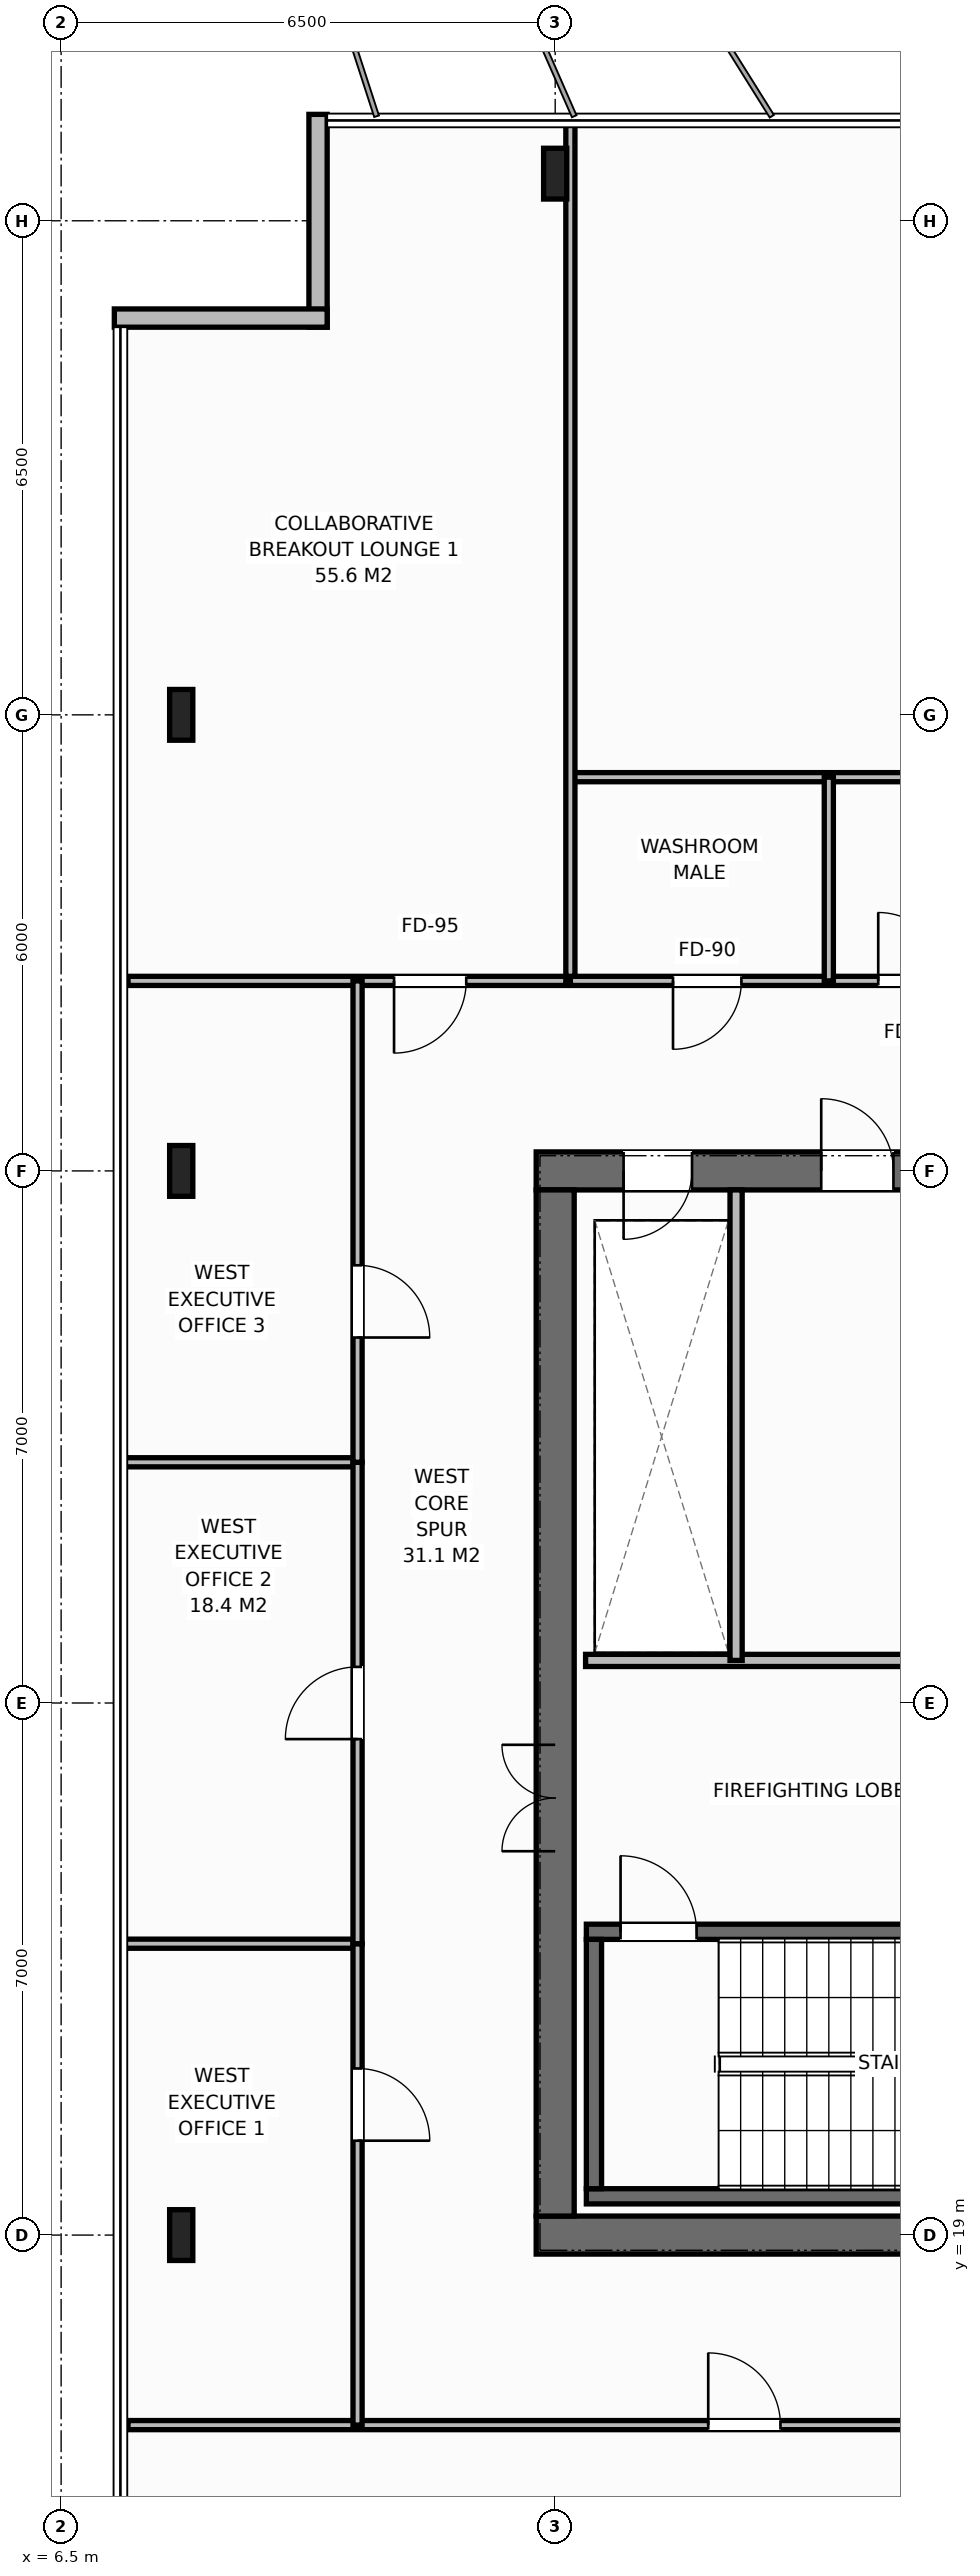
"""IFC4 building model, lengths in metres.
Left out: names, types, materials, properties, quantities, classifications, styles, units other than length and angle.
Written with IfcOpenShell. Run it as: python <this file> out.ifc"""

import sys

from ifc_helpers import new_model, si_unit, direction, frame, frame_2d, origin, origin_2d, place, context, subcontext, project, spatial, rectangle, i_section, extrude, element, fill, save


model = new_model("IFC4")
c1 = context("Model", 3, precision=1e-05, world=origin(), true_north=direction((0.0, 1.0)))
c2 = subcontext(c1, "Body", "Model", "MODEL_VIEW")
j1 = project(units=[si_unit("LENGTHUNIT", "METRE"), si_unit("PLANEANGLEUNIT", "RADIAN")], contexts=[c1])
p1 = place(None, origin())
s1 = spatial("IfcSite", under=j1, at=p1, CompositionType="ELEMENT")
p2 = place(p1, origin())
s2 = spatial("IfcBuilding", under=s1, at=p2, CompositionType="ELEMENT")
p3 = place(p2, frame((0.0, 0.0, 263.2)))
s3 = spatial("IfcBuildingStorey", under=s2, at=p3, CompositionType="ELEMENT", Elevation=263.2)
p4 = place(p3, frame((12.75, 19.0, 0.0), z_axis=(0.0, 0.0, 1.0), x_axis=(1.0, 0.0, 0.0)))
e1 = element("IfcWall", 1, at=p4, inside=s3, PredefinedType="SHEAR", context=c2, shape_type="SweptSolid", body=[
    extrude(rectangle(XDim=13.5, YDim=0.5, at=frame_2d((6.75, 0.0))), origin(), (0.0, 0.0, 1.0), 3.8),
])
p5 = place(p4, frame((9.13, 0.0, 0.0)))
e2 = element("IfcOpeningElement", 2, at=p5, cuts=e1, PredefinedType="OPENING", context=c2, shape_type="SweptSolid", body=[
    extrude(rectangle(XDim=1.4, YDim=2.2, at=frame_2d((0.7, 1.1))), frame((0.0, 0.26, 0.0), z_axis=(0.0, -1.0, 0.0), x_axis=(1.0, 0.0, 0.0)), (0.0, 0.0, 1.0), 0.52),
])
p6 = place(p3, frame((12.75, 33.0, 0.0), z_axis=(0.0, 0.0, 1.0), x_axis=(1.0, 0.0, 0.0)))
e3 = element("IfcWall", 3, at=p6, inside=s3, PredefinedType="SHEAR", context=c2, shape_type="SweptSolid", body=[
    extrude(rectangle(XDim=13.5, YDim=0.5, at=frame_2d((6.75, 0.0))), origin(), (0.0, 0.0, 1.0), 3.8),
])
p7 = place(p6, frame((1.15, 0.0, 0.0)))
e4 = element("IfcOpeningElement", 4, at=p7, cuts=e3, PredefinedType="OPENING", context=c2, shape_type="SweptSolid", body=[
    extrude(rectangle(XDim=0.9, YDim=2.15, at=frame_2d((0.45, 1.075))), frame((0.0, 0.26, 0.0), z_axis=(0.0, -1.0, 0.0), x_axis=(1.0, 0.0, 0.0)), (0.0, 0.0, 1.0), 0.52),
])
p8 = place(p6, frame((3.75, 0.0, 0.0)))
e5 = element("IfcOpeningElement", 5, at=p8, cuts=e3, PredefinedType="OPENING", context=c2, shape_type="SweptSolid", body=[
    extrude(rectangle(XDim=0.95, YDim=2.15, at=frame_2d((0.475, 1.075))), frame((0.0, 0.26, 0.0), z_axis=(0.0, -1.0, 0.0), x_axis=(1.0, 0.0, 0.0)), (0.0, 0.0, 1.0), 0.52),
])
p9 = place(p6, frame((6.75, 0.0, 0.0)))
e6 = element("IfcOpeningElement", 6, at=p9, cuts=e3, PredefinedType="OPENING", context=c2, shape_type="SweptSolid", body=[
    extrude(rectangle(XDim=0.95, YDim=2.15, at=frame_2d((0.475, 1.075))), frame((0.0, 0.26, 0.0), z_axis=(0.0, -1.0, 0.0), x_axis=(1.0, 0.0, 0.0)), (0.0, 0.0, 1.0), 0.52),
])
p10 = place(p6, frame((9.13, 0.0, 0.0)))
e7 = element("IfcOpeningElement", 7, at=p10, cuts=e3, PredefinedType="OPENING", context=c2, shape_type="SweptSolid", body=[
    extrude(rectangle(XDim=1.4, YDim=2.2, at=frame_2d((0.7, 1.1))), frame((0.0, 0.26, 0.0), z_axis=(0.0, -1.0, 0.0), x_axis=(1.0, 0.0, 0.0)), (0.0, 0.0, 1.0), 0.52),
])
p11 = place(p3, frame((13.0, 19.25, 0.0), z_axis=(0.0, 0.0, 1.0), x_axis=(0.0, 1.0, 0.0)))
e8 = element("IfcWall", 8, at=p11, inside=s3, PredefinedType="SHEAR", context=c2, shape_type="SweptSolid", body=[
    extrude(rectangle(XDim=13.5, YDim=0.5, at=frame_2d((6.75, 0.0))), origin(), (0.0, 0.0, 1.0), 3.8),
])
p12 = place(p11, frame((4.8, 0.0, 0.0)))
e9 = element("IfcOpeningElement", 9, at=p12, cuts=e8, PredefinedType="OPENING", context=c2, shape_type="SweptSolid", body=[
    extrude(rectangle(XDim=1.4, YDim=2.2, at=frame_2d((0.7, 1.1))), frame((0.0, 0.26, 0.0), z_axis=(0.0, -1.0, 0.0), x_axis=(1.0, 0.0, 0.0)), (0.0, 0.0, 1.0), 0.52),
])
p13 = place(p3, frame((13.41, 19.51, 0.0), z_axis=(0.0, 0.0, 1.0), x_axis=(1.0, 0.0, 0.0)))
e10 = element("IfcWall", 10, at=p13, inside=s3, PredefinedType="SHEAR", context=c2, shape_type="SweptSolid", body=[
    extrude(rectangle(XDim=8.43, YDim=0.2, at=frame_2d((4.215, 0.0))), origin(), (0.0, 0.0, 1.0), 3.8),
])
p14 = place(p3, frame((13.41, 22.99, 0.0), z_axis=(0.0, 0.0, 1.0), x_axis=(1.0, 0.0, 0.0)))
e11 = element("IfcWall", 11, at=p14, inside=s3, PredefinedType="SHEAR", context=c2, shape_type="SweptSolid", body=[
    extrude(rectangle(XDim=8.43, YDim=0.2, at=frame_2d((4.215, 0.0))), origin(), (0.0, 0.0, 1.0), 3.8),
])
p15 = place(p14, frame((0.45, 0.0, 0.0)))
e12 = element("IfcOpeningElement", 12, at=p15, cuts=e11, PredefinedType="OPENING", context=c2, shape_type="SweptSolid", body=[
    extrude(rectangle(XDim=1.0, YDim=2.15, at=frame_2d((0.5, 1.075))), frame((0.0, 0.11, 0.0), z_axis=(0.0, -1.0, 0.0), x_axis=(1.0, 0.0, 0.0)), (0.0, 0.0, 1.0), 0.22),
])
p16 = place(p3, frame((13.51, 19.61, 0.0), z_axis=(0.0, 0.0, 1.0), x_axis=(0.0, 1.0, 0.0)))
e13 = element("IfcWall", 13, at=p16, inside=s3, PredefinedType="SHEAR", context=c2, shape_type="SweptSolid", body=[
    extrude(rectangle(XDim=3.28, YDim=0.2, at=frame_2d((1.64, 0.0))), origin(), (0.0, 0.0, 1.0), 3.8),
])
for number, where, z_axis, x_axis in (
    (14, (13.0, 46.12, 0.0), (0.0, 0.0, 1.0), (1.0, 0.0, 0.0)),
    (15, (8.08, 19.0, 0.0), (0.0, 0.0, 1.0), (1.0, 0.0, 0.0)),
    (16, (8.08, 33.0, 0.0), (0.0, 0.0, 1.0), (1.0, 0.0, 0.0)),
    (17, (8.08, 39.0, 0.0), (0.0, 0.0, 1.0), (1.0, 0.0, 0.0)),
):
    element("IfcColumn", number, at=place(p3, frame(where, z_axis=z_axis, x_axis=x_axis)), inside=s3, PredefinedType="COLUMN", context=c2, shape_type="SweptSolid", body=[
        extrude(i_section(OverallWidth=0.305, OverallDepth=0.668, WebThickness=0.021, FlangeThickness=0.04, at=origin_2d()), origin(), (0.0, 0.0, 1.0), 3.8),
    ])
p17 = place(p3, frame((9.88, 44.1, 0.0), z_axis=(0.0, 0.0, 1.0), x_axis=(0.0, 1.0, 0.0)))
e18 = element("IfcWall", 18, at=p17, inside=s3, PredefinedType="STANDARD", context=c2, shape_type="SweptSolid", body=[
    extrude(rectangle(XDim=2.8, YDim=0.24, at=frame_2d((1.4, 0.0))), origin(), (0.0, 0.0, 1.0), 3.588),
])
p18 = place(p3, frame((7.2, 44.22, 0.0), z_axis=(0.0, 0.0, 1.0), x_axis=(1.0, 0.0, 0.0)))
e19 = element("IfcWall", 19, at=p18, inside=s3, PredefinedType="STANDARD", context=c2, shape_type="SweptSolid", body=[
    extrude(rectangle(XDim=2.8, YDim=0.24, at=frame_2d((1.4, 0.0))), origin(), (0.0, 0.0, 1.0), 3.588),
])
p19 = place(p3, frame((13.4, 26.56, 0.0), z_axis=(0.0, 0.0, 1.0), x_axis=(1.0, 0.0, 0.0)))
e20 = element("IfcWall", 20, at=p19, inside=s3, PredefinedType="STANDARD", context=c2, shape_type="SweptSolid", body=[
    extrude(rectangle(XDim=8.34, YDim=0.16, at=frame_2d((4.17, 0.0))), origin(), (0.0, 0.0, 1.0), 3.588),
])
p20 = place(p3, frame((15.38, 26.56, 0.0), z_axis=(0.0, 0.0, 1.0), x_axis=(0.0, 1.0, 0.0)))
e21 = element("IfcWall", 21, at=p20, inside=s3, PredefinedType="STANDARD", context=c2, shape_type="SweptSolid", body=[
    extrude(rectangle(XDim=6.19, YDim=0.16, at=frame_2d((3.095, 0.0))), origin(), (0.0, 0.0, 1.0), 3.588),
])
p21 = place(p3, frame((13.2, 35.5, 0.0), z_axis=(0.0, 0.0, 1.0), x_axis=(1.0, 0.0, 0.0)))
e22 = element("IfcWall", 22, at=p21, inside=s3, PredefinedType="PARTITIONING", context=c2, shape_type="SweptSolid", body=[
    extrude(rectangle(XDim=13.16, YDim=0.12, at=frame_2d((6.58, 0.0))), origin(), (0.0, 0.0, 1.0), 3.588),
])
p22 = place(p21, frame((1.35, 0.0, 0.0)))
e23 = element("IfcOpeningElement", 23, at=p22, cuts=e22, PredefinedType="OPENING", context=c2, shape_type="SweptSolid", body=[
    extrude(rectangle(XDim=0.9, YDim=2.15, at=frame_2d((0.45, 1.075))), frame((0.0, 0.07, 0.0), z_axis=(0.0, -1.0, 0.0), x_axis=(1.0, 0.0, 0.0)), (0.0, 0.0, 1.0), 0.14),
])
p23 = place(p21, frame((4.05, 0.0, 0.0)))
e24 = element("IfcOpeningElement", 24, at=p23, cuts=e22, PredefinedType="OPENING", context=c2, shape_type="SweptSolid", body=[
    extrude(rectangle(XDim=0.9, YDim=2.15, at=frame_2d((0.45, 1.075))), frame((0.0, 0.07, 0.0), z_axis=(0.0, -1.0, 0.0), x_axis=(1.0, 0.0, 0.0)), (0.0, 0.0, 1.0), 0.14),
])
p24 = place(p21, frame((8.25, 0.0, 0.0)))
e25 = element("IfcOpeningElement", 25, at=p24, cuts=e22, PredefinedType="OPENING", context=c2, shape_type="SweptSolid", body=[
    extrude(rectangle(XDim=0.9, YDim=2.15, at=frame_2d((0.45, 1.075))), frame((0.0, 0.07, 0.0), z_axis=(0.0, -1.0, 0.0), x_axis=(1.0, 0.0, 0.0)), (0.0, 0.0, 1.0), 0.14),
])
p25 = place(p21, frame((11.0, 0.0, 0.0)))
e26 = element("IfcOpeningElement", 26, at=p25, cuts=e22, PredefinedType="OPENING", context=c2, shape_type="SweptSolid", body=[
    extrude(rectangle(XDim=0.95, YDim=2.15, at=frame_2d((0.475, 1.075))), frame((0.0, 0.07, 0.0), z_axis=(0.0, -1.0, 0.0), x_axis=(1.0, 0.0, 0.0)), (0.0, 0.0, 1.0), 0.14),
])
p26 = place(p3, frame((13.2, 38.18, 0.0), z_axis=(0.0, 0.0, 1.0), x_axis=(1.0, 0.0, 0.0)))
e27 = element("IfcWall", 27, at=p26, inside=s3, PredefinedType="PARTITIONING", context=c2, shape_type="SweptSolid", body=[
    extrude(rectangle(XDim=13.16, YDim=0.12, at=frame_2d((6.58, 0.0))), origin(), (0.0, 0.0, 1.0), 3.588),
])
p27 = place(p3, frame((16.6, 35.5, 0.0), z_axis=(0.0, 0.0, 1.0), x_axis=(0.0, 1.0, 0.0)))
e28 = element("IfcWall", 28, at=p27, inside=s3, PredefinedType="PARTITIONING", context=c2, shape_type="SweptSolid", body=[
    extrude(rectangle(XDim=2.68, YDim=0.12, at=frame_2d((1.34, 0.0))), origin(), (0.0, 0.0, 1.0), 3.588),
])
p28 = place(p3, frame((13.2, 35.56, 0.0), z_axis=(0.0, 0.0, 1.0), x_axis=(0.0, 1.0, 0.0)))
e29 = element("IfcWall", 29, at=p28, inside=s3, PredefinedType="PARTITIONING", context=c2, shape_type="SweptSolid", body=[
    extrude(rectangle(XDim=11.32, YDim=0.12, at=frame_2d((5.66, 0.0))), origin(), (0.0, 0.0, 1.0), 2.788),
])
p29 = place(p3, frame((7.38, 35.5, 0.0), z_axis=(0.0, 0.0, 1.0), x_axis=(1.0, 0.0, 0.0)))
e30 = element("IfcWall", 30, at=p29, inside=s3, PredefinedType="PARTITIONING", context=c2, shape_type="SweptSolid", body=[
    extrude(rectangle(XDim=5.76, YDim=0.12, at=frame_2d((2.88, 0.0))), origin(), (0.0, 0.0, 1.0), 3.588),
])
p30 = place(p29, frame((3.5, 0.0, 0.0)))
e31 = element("IfcOpeningElement", 31, at=p30, cuts=e30, PredefinedType="OPENING", context=c2, shape_type="SweptSolid", body=[
    extrude(rectangle(XDim=0.95, YDim=2.15, at=frame_2d((0.475, 1.075))), frame((0.0, 0.07, 0.0), z_axis=(0.0, -1.0, 0.0), x_axis=(1.0, 0.0, 0.0)), (0.0, 0.0, 1.0), 0.14),
])
p31 = place(p3, frame((7.38, 16.5, 0.0), z_axis=(0.0, 0.0, 1.0), x_axis=(1.0, 0.0, 0.0)))
e32 = element("IfcWall", 32, at=p31, inside=s3, PredefinedType="PARTITIONING", context=c2, shape_type="SweptSolid", body=[
    extrude(rectangle(XDim=13.197, YDim=0.12, at=frame_2d((6.598, 0.0))), origin(), (0.0, 0.0, 1.0), 3.588),
])
p32 = place(p31, frame((7.633, 0.0, 0.0)))
e33 = element("IfcOpeningElement", 33, at=p32, cuts=e32, PredefinedType="OPENING", context=c2, shape_type="SweptSolid", body=[
    extrude(rectangle(XDim=0.95, YDim=2.15, at=frame_2d((0.475, 1.075))), frame((0.0, 0.07, 0.0), z_axis=(0.0, -1.0, 0.0), x_axis=(1.0, 0.0, 0.0)), (0.0, 0.0, 1.0), 0.14),
])
p33 = place(p3, frame((7.22, 22.833, 0.0), z_axis=(0.0, 0.0, 1.0), x_axis=(1.0, 0.0, 0.0)))
e34 = element("IfcWall", 34, at=p33, inside=s3, PredefinedType="PARTITIONING", context=c2, shape_type="SweptSolid", body=[
    extrude(rectangle(XDim=3.18, YDim=0.12, at=frame_2d((1.59, 0.0))), origin(), (0.0, 0.0, 1.0), 3.588),
])
p34 = place(p3, frame((10.4, 16.5, 0.0), z_axis=(0.0, 0.0, 1.0), x_axis=(0.0, 1.0, 0.0)))
e35 = element("IfcWall", 35, at=p34, inside=s3, PredefinedType="PARTITIONING", context=c2, shape_type="SweptSolid", body=[
    extrude(rectangle(XDim=6.333, YDim=0.12, at=frame_2d((3.167, 0.0))), origin(), (0.0, 0.0, 1.0), 3.588),
])
p35 = place(p34, frame((3.742, 0.0, 0.0)))
e36 = element("IfcOpeningElement", 36, at=p35, cuts=e35, PredefinedType="OPENING", context=c2, shape_type="SweptSolid", body=[
    extrude(rectangle(XDim=0.95, YDim=2.15, at=frame_2d((0.475, 1.075))), frame((0.0, 0.07, 0.0), z_axis=(0.0, -1.0, 0.0), x_axis=(1.0, 0.0, 0.0)), (0.0, 0.0, 1.0), 0.14),
])
p36 = place(p3, frame((7.22, 29.167, 0.0), z_axis=(0.0, 0.0, 1.0), x_axis=(1.0, 0.0, 0.0)))
e37 = element("IfcWall", 37, at=p36, inside=s3, PredefinedType="PARTITIONING", context=c2, shape_type="SweptSolid", body=[
    extrude(rectangle(XDim=3.18, YDim=0.12, at=frame_2d((1.59, 0.0))), origin(), (0.0, 0.0, 1.0), 3.588),
])
p37 = place(p3, frame((10.4, 22.833, 0.0), z_axis=(0.0, 0.0, 1.0), x_axis=(0.0, 1.0, 0.0)))
e38 = element("IfcWall", 38, at=p37, inside=s3, PredefinedType="PARTITIONING", context=c2, shape_type="SweptSolid", body=[
    extrude(rectangle(XDim=6.333, YDim=0.12, at=frame_2d((3.167, 0.0))), origin(), (0.0, 0.0, 1.0), 3.588),
])
p38 = place(p37, frame((2.692, 0.0, 0.0)))
e39 = element("IfcOpeningElement", 39, at=p38, cuts=e38, PredefinedType="OPENING", context=c2, shape_type="SweptSolid", body=[
    extrude(rectangle(XDim=0.95, YDim=2.15, at=frame_2d((0.475, 1.075))), frame((0.0, 0.07, 0.0), z_axis=(0.0, -1.0, 0.0), x_axis=(1.0, 0.0, 0.0)), (0.0, 0.0, 1.0), 0.14),
])
p39 = place(p3, frame((10.4, 29.167, 0.0), z_axis=(0.0, 0.0, 1.0), x_axis=(0.0, 1.0, 0.0)))
e40 = element("IfcWall", 40, at=p39, inside=s3, PredefinedType="PARTITIONING", context=c2, shape_type="SweptSolid", body=[
    extrude(rectangle(XDim=6.333, YDim=0.12, at=frame_2d((3.167, 0.0))), origin(), (0.0, 0.0, 1.0), 3.588),
])
p40 = place(p39, frame((1.642, 0.0, 0.0)))
e41 = element("IfcOpeningElement", 41, at=p40, cuts=e40, PredefinedType="OPENING", context=c2, shape_type="SweptSolid", body=[
    extrude(rectangle(XDim=0.95, YDim=2.15, at=frame_2d((0.475, 1.075))), frame((0.0, 0.07, 0.0), z_axis=(0.0, -1.0, 0.0), x_axis=(1.0, 0.0, 0.0)), (0.0, 0.0, 1.0), 0.14),
])
p41 = place(p15, origin())
e42 = element("IfcDoor", 42, at=p41, inside=s3, OperationType="SINGLE_SWING_LEFT", PredefinedType="DOOR", context=c2, shape_type="SweptSolid", body=[
    extrude(rectangle(XDim=1.0, YDim=2.15, at=frame_2d((0.5, 1.075))), frame((0.0, 0.025, 0.0), z_axis=(0.0, -1.0, 0.0), x_axis=(1.0, 0.0, 0.0)), (0.0, 0.0, 1.0), 0.05),
])
fill(e12, e42)
p42 = place(p12, origin())
e43 = element("IfcDoor", 43, at=p42, inside=s3, OperationType="DOUBLE_DOOR_SINGLE_SWING", PredefinedType="DOOR", context=c2, shape_type="SweptSolid", body=[
    extrude(rectangle(XDim=1.4, YDim=2.2, at=frame_2d((0.7, 1.1))), frame((0.0, 0.025, 0.0), z_axis=(0.0, -1.0, 0.0), x_axis=(1.0, 0.0, 0.0)), (0.0, 0.0, 1.0), 0.05),
])
fill(e9, e43)
p43 = place(p7, origin())
e44 = element("IfcDoor", 44, at=p43, inside=s3, OperationType="SINGLE_SWING_RIGHT", PredefinedType="DOOR", context=c2, shape_type="SweptSolid", body=[
    extrude(rectangle(XDim=0.9, YDim=2.15, at=frame_2d((0.45, 1.075))), frame((0.0, -0.025, 0.0), z_axis=(0.0, -1.0, 0.0), x_axis=(1.0, 0.0, 0.0)), (0.0, 0.0, 1.0), 0.05),
])
fill(e4, e44)
p44 = place(p8, origin())
e45 = element("IfcDoor", 45, at=p44, inside=s3, OperationType="SINGLE_SWING_LEFT", PredefinedType="DOOR", context=c2, shape_type="SweptSolid", body=[
    extrude(rectangle(XDim=0.95, YDim=2.15, at=frame_2d((0.475, 1.075))), frame((0.0, -0.025, 0.0), z_axis=(0.0, -1.0, 0.0), x_axis=(1.0, 0.0, 0.0)), (0.0, 0.0, 1.0), 0.05),
])
fill(e5, e45)
p45 = place(p22, origin())
e46 = element("IfcDoor", 46, at=p45, inside=s3, OperationType="SINGLE_SWING_RIGHT", PredefinedType="DOOR", context=c2, shape_type="SweptSolid", body=[
    extrude(rectangle(XDim=0.9, YDim=2.15, at=frame_2d((0.45, 1.075))), frame((0.0, 0.025, 0.0), z_axis=(0.0, -1.0, 0.0), x_axis=(1.0, 0.0, 0.0)), (0.0, 0.0, 1.0), 0.05),
])
fill(e23, e46)
p46 = place(p23, origin())
e47 = element("IfcDoor", 47, at=p46, inside=s3, OperationType="SINGLE_SWING_LEFT", PredefinedType="DOOR", context=c2, shape_type="SweptSolid", body=[
    extrude(rectangle(XDim=0.9, YDim=2.15, at=frame_2d((0.45, 1.075))), frame((0.0, 0.025, 0.0), z_axis=(0.0, -1.0, 0.0), x_axis=(1.0, 0.0, 0.0)), (0.0, 0.0, 1.0), 0.05),
])
fill(e24, e47)
p47 = place(p30, origin())
e48 = element("IfcDoor", 48, at=p47, inside=s3, OperationType="SINGLE_SWING_RIGHT", PredefinedType="DOOR", context=c2, shape_type="SweptSolid", body=[
    extrude(rectangle(XDim=0.95, YDim=2.15, at=frame_2d((0.475, 1.075))), frame((0.0, 0.025, 0.0), z_axis=(0.0, -1.0, 0.0), x_axis=(1.0, 0.0, 0.0)), (0.0, 0.0, 1.0), 0.05),
])
fill(e31, e48)
p48 = place(p32, origin())
e49 = element("IfcDoor", 49, at=p48, inside=s3, OperationType="SINGLE_SWING_LEFT", PredefinedType="DOOR", context=c2, shape_type="SweptSolid", body=[
    extrude(rectangle(XDim=0.95, YDim=2.15, at=frame_2d((0.475, 1.075))), frame((0.0, 0.025, 0.0), z_axis=(0.0, -1.0, 0.0), x_axis=(1.0, 0.0, 0.0)), (0.0, 0.0, 1.0), 0.05),
])
fill(e33, e49)
p49 = place(p35, origin())
e50 = element("IfcDoor", 50, at=p49, inside=s3, OperationType="SINGLE_SWING_RIGHT", PredefinedType="DOOR", context=c2, shape_type="SweptSolid", body=[
    extrude(rectangle(XDim=0.95, YDim=2.15, at=frame_2d((0.475, 1.075))), frame((0.0, 0.025, 0.0), z_axis=(0.0, -1.0, 0.0), x_axis=(1.0, 0.0, 0.0)), (0.0, 0.0, 1.0), 0.05),
])
fill(e36, e50)
p50 = place(p38, origin())
e51 = element("IfcDoor", 51, at=p50, inside=s3, OperationType="SINGLE_SWING_LEFT", PredefinedType="DOOR", context=c2, shape_type="SweptSolid", body=[
    extrude(rectangle(XDim=0.95, YDim=2.15, at=frame_2d((0.475, 1.075))), frame((0.0, 0.025, 0.0), z_axis=(0.0, -1.0, 0.0), x_axis=(1.0, 0.0, 0.0)), (0.0, 0.0, 1.0), 0.05),
])
fill(e39, e51)
p51 = place(p40, origin())
e52 = element("IfcDoor", 52, at=p51, inside=s3, OperationType="SINGLE_SWING_RIGHT", PredefinedType="DOOR", context=c2, shape_type="SweptSolid", body=[
    extrude(rectangle(XDim=0.95, YDim=2.15, at=frame_2d((0.475, 1.075))), frame((0.0, 0.025, 0.0), z_axis=(0.0, -1.0, 0.0), x_axis=(1.0, 0.0, 0.0)), (0.0, 0.0, 1.0), 0.05),
])
fill(e41, e52)
save(model, sys.argv[1])
